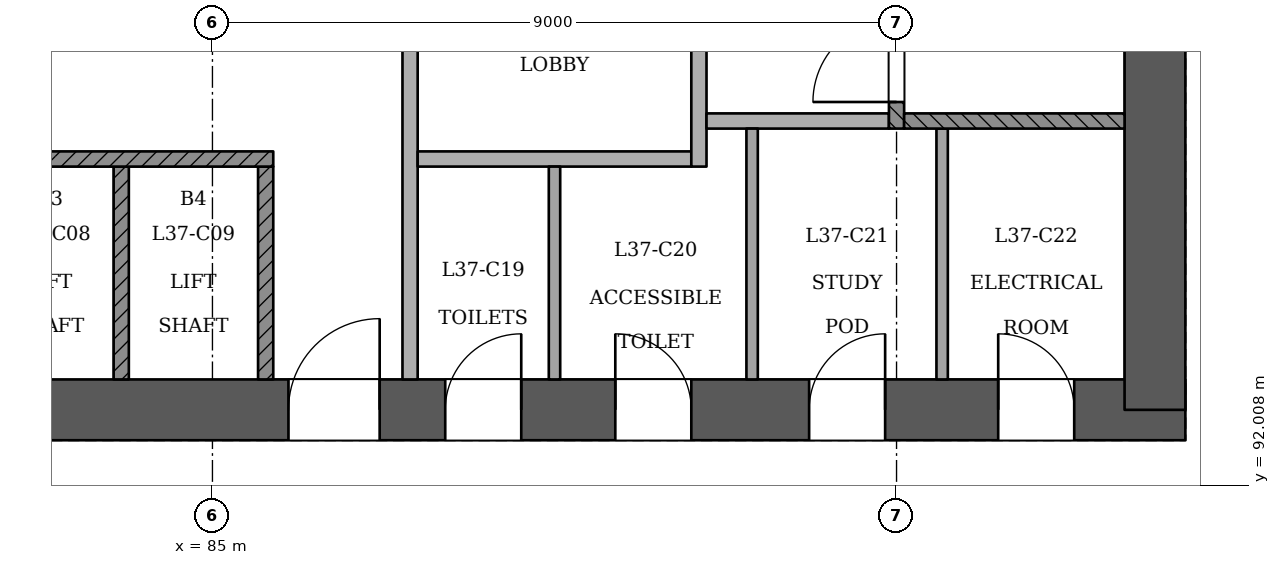
"""IFC4 building model, lengths in metres.
Left out: names, types, materials, properties, quantities, classifications, styles, units other than length and angle.
Written with IfcOpenShell. Run it as: python <this file> out.ifc"""

import sys

from ifc_helpers import new_model, si_unit, direction, frame, frame_2d, origin, place, context, subcontext, project, spatial, rectangle, extrude, element, fill, save


model = new_model("IFC4")
c1 = context("Model", 3, precision=1e-05, world=origin(), true_north=direction((0.0, 1.0)))
c2 = subcontext(c1, "Body", "Model", "MODEL_VIEW")
j1 = project(units=[si_unit("LENGTHUNIT", "METRE"), si_unit("PLANEANGLEUNIT", "RADIAN")], contexts=[c1])
p1 = place(None, origin())
s1 = spatial("IfcSite", under=j1, at=p1, CompositionType="ELEMENT")
p2 = place(p1, origin())
s2 = spatial("IfcBuilding", under=s1, at=p2, CompositionType="ELEMENT")
p3 = place(p2, frame((0.0, 0.0, 145.8)))
s3 = spatial("IfcBuildingStorey", under=s2, at=p3, CompositionType="ELEMENT", Elevation=145.8)
p4 = place(p3, frame((72.6, 93.0, 0.0), z_axis=(0.0, 0.0, 1.0), x_axis=(1.0, 0.0, 0.0)))
e1 = element("IfcWall", 1, at=p4, inside=s3, PredefinedType="SHEAR", context=c2, shape_type="SweptSolid", body=[
    extrude(rectangle(XDim=25.2, YDim=0.8, at=frame_2d((12.6, 0.0))), origin(), (0.0, 0.0, 1.0), 3.6),
])
p5 = place(p4, frame((1.2, 0.0, 0.0)))
e2 = element("IfcOpeningElement", 2, at=p5, cuts=e1, PredefinedType="OPENING", context=c2, shape_type="SweptSolid", body=[
    extrude(rectangle(XDim=1.2, YDim=2.1, at=frame_2d((0.6, 1.05))), frame((0.0, 0.411, 0.0), z_axis=(0.0, -1.0, 0.0), x_axis=(1.0, 0.0, 0.0)), (0.0, 0.0, 1.0), 0.821),
])
p6 = place(p4, frame((3.4, 0.0, 0.0)))
e3 = element("IfcOpeningElement", 3, at=p6, cuts=e1, PredefinedType="OPENING", context=c2, shape_type="SweptSolid", body=[
    extrude(rectangle(XDim=1.2, YDim=2.1, at=frame_2d((0.6, 1.05))), frame((0.0, 0.411, 0.0), z_axis=(0.0, -1.0, 0.0), x_axis=(1.0, 0.0, 0.0)), (0.0, 0.0, 1.0), 0.821),
])
p7 = place(p4, frame((13.4, 0.0, 0.0)))
e4 = element("IfcOpeningElement", 4, at=p7, cuts=e1, PredefinedType="OPENING", context=c2, shape_type="SweptSolid", body=[
    extrude(rectangle(XDim=1.2, YDim=2.1, at=frame_2d((0.6, 1.05))), frame((0.0, 0.411, 0.0), z_axis=(0.0, -1.0, 0.0), x_axis=(1.0, 0.0, 0.0)), (0.0, 0.0, 1.0), 0.821),
])
p8 = place(p4, frame((15.462, 0.0, 0.0)))
e5 = element("IfcOpeningElement", 5, at=p8, cuts=e1, PredefinedType="OPENING", context=c2, shape_type="SweptSolid", body=[
    extrude(rectangle(XDim=1.0, YDim=2.1, at=frame_2d((0.5, 1.05))), frame((0.0, 0.411, 0.0), z_axis=(0.0, -1.0, 0.0), x_axis=(1.0, 0.0, 0.0)), (0.0, 0.0, 1.0), 0.821),
])
p9 = place(p4, frame((17.7, 0.0, 0.0)))
e6 = element("IfcOpeningElement", 6, at=p9, cuts=e1, PredefinedType="OPENING", context=c2, shape_type="SweptSolid", body=[
    extrude(rectangle(XDim=1.0, YDim=2.1, at=frame_2d((0.5, 1.05))), frame((0.0, 0.411, 0.0), z_axis=(0.0, -1.0, 0.0), x_axis=(1.0, 0.0, 0.0)), (0.0, 0.0, 1.0), 0.821),
])
p10 = place(p4, frame((20.25, 0.0, 0.0)))
e7 = element("IfcOpeningElement", 7, at=p10, cuts=e1, PredefinedType="OPENING", context=c2, shape_type="SweptSolid", body=[
    extrude(rectangle(XDim=1.0, YDim=2.1, at=frame_2d((0.5, 1.05))), frame((0.0, 0.411, 0.0), z_axis=(0.0, -1.0, 0.0), x_axis=(1.0, 0.0, 0.0)), (0.0, 0.0, 1.0), 0.821),
])
p11 = place(p4, frame((22.738, 0.0, 0.0)))
e8 = element("IfcOpeningElement", 8, at=p11, cuts=e1, PredefinedType="OPENING", context=c2, shape_type="SweptSolid", body=[
    extrude(rectangle(XDim=1.0, YDim=2.1, at=frame_2d((0.5, 1.05))), frame((0.0, 0.411, 0.0), z_axis=(0.0, -1.0, 0.0), x_axis=(1.0, 0.0, 0.0)), (0.0, 0.0, 1.0), 0.821),
])
p12 = place(p3, frame((97.4, 93.0, 0.0), z_axis=(0.0, 0.0, 1.0), x_axis=(0.0, 1.0, 0.0)))
e9 = element("IfcWall", 9, at=p12, inside=s3, PredefinedType="SHEAR", context=c2, shape_type="SweptSolid", body=[
    extrude(rectangle(XDim=11.2, YDim=0.8, at=frame_2d((5.6, 0.0))), origin(), (0.0, 0.0, 1.0), 3.6),
])
p13 = place(p3, frame((66.082, 96.91, 0.0), z_axis=(0.0, 0.0, 1.0), x_axis=(0.500001949747, -0.866024278094, 0.0)))
e10 = element("IfcWall", 10, at=p13, inside=s3, PredefinedType="PARTITIONING", context=c2, shape_type="SweptSolid", body=[
    extrude(rectangle(XDim=37.705, YDim=0.15, at=frame_2d((18.853, 0.0))), origin(), (0.0, 0.0, 1.0), 2.75),
])
p14 = place(p13, frame((1.75, 0.0, 0.0)))
e11 = element("IfcOpeningElement", 11, at=p14, cuts=e10, PredefinedType="OPENING", context=c2, shape_type="SweptSolid", body=[
    extrude(rectangle(XDim=1.0, YDim=2.1, at=frame_2d((0.5, 1.05))), frame((0.0, 0.085, 0.0), z_axis=(0.0, -1.0, 0.0), x_axis=(1.0, 0.0, 0.0)), (0.0, 0.0, 1.0), 0.171),
])
p15 = place(p13, frame((7.329, 0.0, 0.0)))
e12 = element("IfcOpeningElement", 12, at=p15, cuts=e10, PredefinedType="OPENING", context=c2, shape_type="SweptSolid", body=[
    extrude(rectangle(XDim=1.1, YDim=2.1, at=frame_2d((0.55, 1.05))), frame((0.0, 0.085, 0.0), z_axis=(0.0, -1.0, 0.0), x_axis=(1.0, 0.0, 0.0)), (0.0, 0.0, 1.0), 0.171),
])
p16 = place(p13, frame((9.72, 0.0, 0.0)))
e13 = element("IfcOpeningElement", 13, at=p16, cuts=e10, PredefinedType="OPENING", context=c2, shape_type="SweptSolid", body=[
    extrude(rectangle(XDim=1.0, YDim=2.1, at=frame_2d((0.5, 1.05))), frame((0.0, 0.085, 0.0), z_axis=(0.0, -1.0, 0.0), x_axis=(1.0, 0.0, 0.0)), (0.0, 0.0, 1.0), 0.171),
])
p17 = place(p13, frame((16.28, 0.0, 0.0)))
e14 = element("IfcOpeningElement", 14, at=p17, cuts=e10, PredefinedType="OPENING", context=c2, shape_type="SweptSolid", body=[
    extrude(rectangle(XDim=1.0, YDim=2.1, at=frame_2d((0.5, 1.05))), frame((0.0, 0.085, 0.0), z_axis=(0.0, -1.0, 0.0), x_axis=(1.0, 0.0, 0.0)), (0.0, 0.0, 1.0), 0.171),
])
p18 = place(p13, frame((18.72, 0.0, 0.0)))
e15 = element("IfcOpeningElement", 15, at=p18, cuts=e10, PredefinedType="OPENING", context=c2, shape_type="SweptSolid", body=[
    extrude(rectangle(XDim=1.0, YDim=2.1, at=frame_2d((0.5, 1.05))), frame((0.0, 0.085, 0.0), z_axis=(0.0, -1.0, 0.0), x_axis=(1.0, 0.0, 0.0)), (0.0, 0.0, 1.0), 0.171),
])
p19 = place(p13, frame((25.28, 0.0, 0.0)))
e16 = element("IfcOpeningElement", 16, at=p19, cuts=e10, PredefinedType="OPENING", context=c2, shape_type="SweptSolid", body=[
    extrude(rectangle(XDim=1.0, YDim=2.1, at=frame_2d((0.5, 1.05))), frame((0.0, 0.085, 0.0), z_axis=(0.0, -1.0, 0.0), x_axis=(1.0, 0.0, 0.0)), (0.0, 0.0, 1.0), 0.171),
])
p20 = place(p13, frame((27.72, 0.0, 0.0)))
e17 = element("IfcOpeningElement", 17, at=p20, cuts=e10, PredefinedType="OPENING", context=c2, shape_type="SweptSolid", body=[
    extrude(rectangle(XDim=1.0, YDim=2.1, at=frame_2d((0.5, 1.05))), frame((0.0, 0.085, 0.0), z_axis=(0.0, -1.0, 0.0), x_axis=(1.0, 0.0, 0.0)), (0.0, 0.0, 1.0), 0.171),
])
p21 = place(p13, frame((34.329, 0.0, 0.0)))
e18 = element("IfcOpeningElement", 18, at=p21, cuts=e10, PredefinedType="OPENING", context=c2, shape_type="SweptSolid", body=[
    extrude(rectangle(XDim=1.1, YDim=2.1, at=frame_2d((0.55, 1.05))), frame((0.0, 0.085, 0.0), z_axis=(0.0, -1.0, 0.0), x_axis=(1.0, 0.0, 0.0)), (0.0, 0.0, 1.0), 0.171),
])
p22 = place(p3, frame((85.0, 64.144, 0.0), z_axis=(0.0, 0.0, 1.0), x_axis=(0.50000053273, 0.866025096212, 0.0)))
e19 = element("IfcWall", 19, at=p22, inside=s3, PredefinedType="PARTITIONING", context=c2, shape_type="SweptSolid", body=[
    extrude(rectangle(XDim=39.671, YDim=0.15, at=frame_2d((19.835, 0.0))), origin(), (0.0, 0.0, 1.0), 2.75),
])
p23 = place(p22, frame((0.618, 0.0, 0.0)))
e20 = element("IfcOpeningElement", 20, at=p23, cuts=e19, PredefinedType="OPENING", context=c2, shape_type="SweptSolid", body=[
    extrude(rectangle(XDim=1.2, YDim=2.1, at=frame_2d((0.6, 1.05))), frame((0.0, 0.085, 0.0), z_axis=(0.0, -1.0, 0.0), x_axis=(1.0, 0.0, 0.0)), (0.0, 0.0, 1.0), 0.171),
])
p24 = place(p22, frame((9.115, 0.0, 0.0)))
e21 = element("IfcOpeningElement", 21, at=p24, cuts=e19, PredefinedType="OPENING", context=c2, shape_type="SweptSolid", body=[
    extrude(rectangle(XDim=1.0, YDim=2.1, at=frame_2d((0.5, 1.05))), frame((0.0, 0.085, 0.0), z_axis=(0.0, -1.0, 0.0), x_axis=(1.0, 0.0, 0.0)), (0.0, 0.0, 1.0), 0.171),
])
p25 = place(p22, frame((11.556, 0.0, 0.0)))
e22 = element("IfcOpeningElement", 22, at=p25, cuts=e19, PredefinedType="OPENING", context=c2, shape_type="SweptSolid", body=[
    extrude(rectangle(XDim=1.0, YDim=2.1, at=frame_2d((0.5, 1.05))), frame((0.0, 0.085, 0.0), z_axis=(0.0, -1.0, 0.0), x_axis=(1.0, 0.0, 0.0)), (0.0, 0.0, 1.0), 0.171),
])
p26 = place(p22, frame((18.115, 0.0, 0.0)))
e23 = element("IfcOpeningElement", 23, at=p26, cuts=e19, PredefinedType="OPENING", context=c2, shape_type="SweptSolid", body=[
    extrude(rectangle(XDim=1.0, YDim=2.1, at=frame_2d((0.5, 1.05))), frame((0.0, 0.085, 0.0), z_axis=(0.0, -1.0, 0.0), x_axis=(1.0, 0.0, 0.0)), (0.0, 0.0, 1.0), 0.171),
])
p27 = place(p22, frame((20.556, 0.0, 0.0)))
e24 = element("IfcOpeningElement", 24, at=p27, cuts=e19, PredefinedType="OPENING", context=c2, shape_type="SweptSolid", body=[
    extrude(rectangle(XDim=1.0, YDim=2.1, at=frame_2d((0.5, 1.05))), frame((0.0, 0.085, 0.0), z_axis=(0.0, -1.0, 0.0), x_axis=(1.0, 0.0, 0.0)), (0.0, 0.0, 1.0), 0.171),
])
p28 = place(p22, frame((27.115, 0.0, 0.0)))
e25 = element("IfcOpeningElement", 25, at=p28, cuts=e19, PredefinedType="OPENING", context=c2, shape_type="SweptSolid", body=[
    extrude(rectangle(XDim=1.0, YDim=2.1, at=frame_2d((0.5, 1.05))), frame((0.0, 0.085, 0.0), z_axis=(0.0, -1.0, 0.0), x_axis=(1.0, 0.0, 0.0)), (0.0, 0.0, 1.0), 0.171),
])
p29 = place(p22, frame((30.585, 0.0, 0.0)))
e26 = element("IfcOpeningElement", 26, at=p29, cuts=e19, PredefinedType="OPENING", context=c2, shape_type="SweptSolid", body=[
    extrude(rectangle(XDim=1.0, YDim=2.1, at=frame_2d((0.5, 1.05))), frame((0.0, 0.085, 0.0), z_axis=(0.0, -1.0, 0.0), x_axis=(1.0, 0.0, 0.0)), (0.0, 0.0, 1.0), 0.171),
])
p30 = place(p22, frame((36.164, 0.0, 0.0)))
e27 = element("IfcOpeningElement", 27, at=p30, cuts=e19, PredefinedType="OPENING", context=c2, shape_type="SweptSolid", body=[
    extrude(rectangle(XDim=1.1, YDim=2.1, at=frame_2d((0.55, 1.05))), frame((0.0, 0.085, 0.0), z_axis=(0.0, -1.0, 0.0), x_axis=(1.0, 0.0, 0.0)), (0.0, 0.0, 1.0), 0.171),
])
p31 = place(p22, frame((38.271, 0.0, 0.0)))
e28 = element("IfcOpeningElement", 28, at=p31, cuts=e19, PredefinedType="OPENING", context=c2, shape_type="SweptSolid", body=[
    extrude(rectangle(XDim=1.2, YDim=2.1, at=frame_2d((0.6, 1.05))), frame((0.0, 0.085, 0.0), z_axis=(0.0, -1.0, 0.0), x_axis=(1.0, 0.0, 0.0)), (0.0, 0.0, 1.0), 0.171),
])
for number, where, z_axis, x_axis in (
    (29, (83.8, 93.4, 0.0), (0.0, 0.0, 1.0), (0.0, 1.0, 0.0)),
    (30, (85.7, 93.4, 0.0), (0.0, 0.0, 1.0), (0.0, 1.0, 0.0)),
):
    element("IfcWall", number, at=place(p3, frame(where, z_axis=z_axis, x_axis=x_axis)), inside=s3, PredefinedType="SOLIDWALL", context=c2, shape_type="SweptSolid", body=[
        extrude(rectangle(XDim=2.8, YDim=0.2, at=frame_2d((1.4, 0.0))), origin(), (0.0, 0.0, 1.0), 3.15),
    ])
p32 = place(p3, frame((87.6, 93.4, 0.0), z_axis=(0.0, 0.0, 1.0), x_axis=(0.0, 1.0, 0.0)))
e31 = element("IfcWall", 31, at=p32, inside=s3, PredefinedType="PARTITIONING", context=c2, shape_type="SweptSolid", body=[
    extrude(rectangle(XDim=7.0, YDim=0.2, at=frame_2d((3.5, 0.0))), origin(), (0.0, 0.0, 1.0), 3.15),
])
p33 = place(p32, frame((4.45, 0.0, 0.0)))
e32 = element("IfcOpeningElement", 32, at=p33, cuts=e31, PredefinedType="OPENING", context=c2, shape_type="SweptSolid", body=[
    extrude(rectangle(XDim=1.1, YDim=2.1, at=frame_2d((0.55, 1.05))), frame((0.0, 0.11, 0.0), z_axis=(0.0, -1.0, 0.0), x_axis=(1.0, 0.0, 0.0)), (0.0, 0.0, 1.0), 0.221),
])
p34 = place(p3, frame((89.5, 93.4, 0.0), z_axis=(0.0, 0.0, 1.0), x_axis=(0.0, 1.0, 0.0)))
e33 = element("IfcWall", 33, at=p34, inside=s3, PredefinedType="PARTITIONING", context=c2, shape_type="SweptSolid", body=[
    extrude(rectangle(XDim=2.8, YDim=0.15, at=frame_2d((1.4, 0.0))), origin(), (0.0, 0.0, 1.0), 3.15),
])
for number, where, z_axis, x_axis in (
    (34, (92.1, 93.4, 0.0), (0.0, 0.0, 1.0), (0.0, 1.0, 0.0)),
    (35, (94.6, 93.4, 0.0), (0.0, 0.0, 1.0), (0.0, 1.0, 0.0)),
):
    element("IfcWall", number, at=place(p3, frame(where, z_axis=z_axis, x_axis=x_axis)), inside=s3, PredefinedType="PARTITIONING", context=c2, shape_type="SweptSolid", body=[
        extrude(rectangle(XDim=3.3, YDim=0.15, at=frame_2d((1.65, 0.0))), origin(), (0.0, 0.0, 1.0), 3.15),
    ])
p35 = place(p3, frame((78.0, 96.3, 0.0), z_axis=(0.0, 0.0, 1.0), x_axis=(1.0, 0.0, 0.0)))
e36 = element("IfcWall", 36, at=p35, inside=s3, PredefinedType="SOLIDWALL", context=c2, shape_type="SweptSolid", body=[
    extrude(rectangle(XDim=7.8, YDim=0.2, at=frame_2d((3.9, 0.0))), origin(), (0.0, 0.0, 1.0), 3.15),
])
p36 = place(p35, frame((1.5, 0.0, 0.0)))
e37 = element("IfcOpeningElement", 37, at=p36, cuts=e36, PredefinedType="OPENING", context=c2, shape_type="SweptSolid", body=[
    extrude(rectangle(XDim=1.0, YDim=2.1, at=frame_2d((0.5, 1.05))), frame((0.0, 0.11, 0.0), z_axis=(0.0, -1.0, 0.0), x_axis=(1.0, 0.0, 0.0)), (0.0, 0.0, 1.0), 0.221),
])
p37 = place(p3, frame((87.7, 96.3, 0.0), z_axis=(0.0, 0.0, 1.0), x_axis=(1.0, 0.0, 0.0)))
e38 = element("IfcWall", 38, at=p37, inside=s3, PredefinedType="PARTITIONING", context=c2, shape_type="SweptSolid", body=[
    extrude(rectangle(XDim=3.6, YDim=0.2, at=frame_2d((1.8, 0.0))), origin(), (0.0, 0.0, 1.0), 3.15),
])
p38 = place(p3, frame((91.4, 96.2, 0.0), z_axis=(0.0, 0.0, 1.0), x_axis=(0.0, 1.0, 0.0)))
e39 = element("IfcWall", 39, at=p38, inside=s3, PredefinedType="PARTITIONING", context=c2, shape_type="SweptSolid", body=[
    extrude(rectangle(XDim=4.2, YDim=0.2, at=frame_2d((2.1, 0.0))), origin(), (0.0, 0.0, 1.0), 3.15),
])
p39 = place(p38, frame((2.45, 0.0, 0.0)))
e40 = element("IfcOpeningElement", 40, at=p39, cuts=e39, PredefinedType="OPENING", context=c2, shape_type="SweptSolid", body=[
    extrude(rectangle(XDim=1.1, YDim=2.1, at=frame_2d((0.55, 1.05))), frame((0.0, 0.11, 0.0), z_axis=(0.0, -1.0, 0.0), x_axis=(1.0, 0.0, 0.0)), (0.0, 0.0, 1.0), 0.221),
])
p40 = place(p3, frame((91.5, 96.8, 0.0), z_axis=(0.0, 0.0, 1.0), x_axis=(1.0, 0.0, 0.0)))
e41 = element("IfcWall", 41, at=p40, inside=s3, PredefinedType="PARTITIONING", context=c2, shape_type="SweptSolid", body=[
    extrude(rectangle(XDim=2.4, YDim=0.2, at=frame_2d((1.2, 0.0))), origin(), (0.0, 0.0, 1.0), 3.15),
])
p41 = place(p3, frame((94.0, 96.7, 0.0), z_axis=(0.0, 0.0, 1.0), x_axis=(0.0, 1.0, 0.0)))
e42 = element("IfcWall", 42, at=p41, inside=s3, PredefinedType="SOLIDWALL", context=c2, shape_type="SweptSolid", body=[
    extrude(rectangle(XDim=3.7, YDim=0.2, at=frame_2d((1.85, 0.0))), origin(), (0.0, 0.0, 1.0), 3.15),
])
p42 = place(p41, frame((0.35, 0.0, 0.0)))
e43 = element("IfcOpeningElement", 43, at=p42, cuts=e42, PredefinedType="OPENING", context=c2, shape_type="SweptSolid", body=[
    extrude(rectangle(XDim=1.1, YDim=2.1, at=frame_2d((0.55, 1.05))), frame((0.0, 0.11, 0.0), z_axis=(0.0, -1.0, 0.0), x_axis=(1.0, 0.0, 0.0)), (0.0, 0.0, 1.0), 0.221),
])
p43 = place(p3, frame((94.1, 96.8, 0.0), z_axis=(0.0, 0.0, 1.0), x_axis=(1.0, 0.0, 0.0)))
e44 = element("IfcWall", 44, at=p43, inside=s3, PredefinedType="SOLIDWALL", context=c2, shape_type="SweptSolid", body=[
    extrude(rectangle(XDim=2.9, YDim=0.2, at=frame_2d((1.45, 0.0))), origin(), (0.0, 0.0, 1.0), 3.15),
])
p44 = place(p42, origin())
e45 = element("IfcDoor", 45, at=p44, inside=s3, OperationType="SINGLE_SWING_LEFT", PredefinedType="NOTDEFINED", context=c2, shape_type="SweptSolid", body=[
    extrude(rectangle(XDim=1.1, YDim=2.1, at=frame_2d((0.55, 1.05))), frame((0.0, 0.025, 0.0), z_axis=(0.0, -1.0, 0.0), x_axis=(1.0, 0.0, 0.0)), (0.0, 0.0, 1.0), 0.05),
])
fill(e43, e45)
p45 = place(p7, origin())
e46 = element("IfcDoor", 46, at=p45, inside=s3, OperationType="SINGLE_SWING_RIGHT", PredefinedType="NOTDEFINED", context=c2, shape_type="SweptSolid", body=[
    extrude(rectangle(XDim=1.2, YDim=2.1, at=frame_2d((0.6, 1.05))), frame((0.0, 0.025, 0.0), z_axis=(0.0, -1.0, 0.0), x_axis=(1.0, 0.0, 0.0)), (0.0, 0.0, 1.0), 0.05),
])
fill(e4, e46)
p46 = place(p8, origin())
e47 = element("IfcDoor", 47, at=p46, inside=s3, OperationType="SINGLE_SWING_RIGHT", PredefinedType="NOTDEFINED", context=c2, shape_type="SweptSolid", body=[
    extrude(rectangle(XDim=1.0, YDim=2.1, at=frame_2d((0.5, 1.05))), frame((0.0, 0.025, 0.0), z_axis=(0.0, -1.0, 0.0), x_axis=(1.0, 0.0, 0.0)), (0.0, 0.0, 1.0), 0.05),
])
fill(e5, e47)
p47 = place(p9, origin())
e48 = element("IfcDoor", 48, at=p47, inside=s3, OperationType="SINGLE_SWING_LEFT", PredefinedType="NOTDEFINED", context=c2, shape_type="SweptSolid", body=[
    extrude(rectangle(XDim=1.0, YDim=2.1, at=frame_2d((0.5, 1.05))), frame((0.0, 0.025, 0.0), z_axis=(0.0, -1.0, 0.0), x_axis=(1.0, 0.0, 0.0)), (0.0, 0.0, 1.0), 0.05),
])
fill(e6, e48)
p48 = place(p10, origin())
e49 = element("IfcDoor", 49, at=p48, inside=s3, OperationType="SINGLE_SWING_RIGHT", PredefinedType="NOTDEFINED", context=c2, shape_type="SweptSolid", body=[
    extrude(rectangle(XDim=1.0, YDim=2.1, at=frame_2d((0.5, 1.05))), frame((0.0, 0.025, 0.0), z_axis=(0.0, -1.0, 0.0), x_axis=(1.0, 0.0, 0.0)), (0.0, 0.0, 1.0), 0.05),
])
fill(e7, e49)
p49 = place(p11, origin())
e50 = element("IfcDoor", 50, at=p49, inside=s3, OperationType="SINGLE_SWING_LEFT", PredefinedType="NOTDEFINED", context=c2, shape_type="SweptSolid", body=[
    extrude(rectangle(XDim=1.0, YDim=2.1, at=frame_2d((0.5, 1.05))), frame((0.0, 0.025, 0.0), z_axis=(0.0, -1.0, 0.0), x_axis=(1.0, 0.0, 0.0)), (0.0, 0.0, 1.0), 0.05),
])
fill(e8, e50)
save(model, sys.argv[1])
